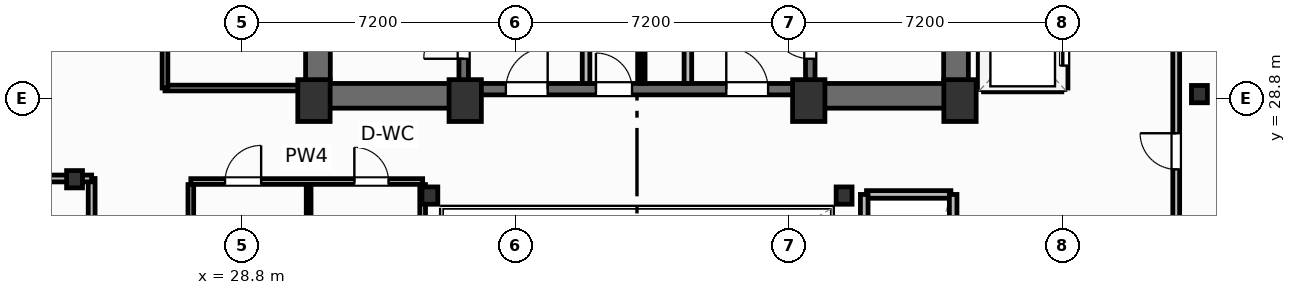
"""IFC4 building model, lengths in metres.
Left out: names, types, materials, properties, quantities, classifications, styles, units other than length and angle.
Written with IfcOpenShell. Run it as: python <this file> out.ifc"""

import sys

from ifc_helpers import new_model, si_unit, direction, frame, frame_2d, origin, origin_2d, place, context, subcontext, project, spatial, rectangle, i_section, extrude, element, fill, save


model = new_model("IFC4")
c1 = context("Model", 3, precision=1e-05, world=origin(), true_north=direction((0.0, 1.0)))
c2 = subcontext(c1, "Body", "Model", "MODEL_VIEW")
j1 = project(units=[si_unit("LENGTHUNIT", "METRE"), si_unit("PLANEANGLEUNIT", "RADIAN")], contexts=[c1])
p1 = place(None, origin())
s1 = spatial("IfcSite", under=j1, at=p1, CompositionType="ELEMENT")
p2 = place(p1, origin())
s2 = spatial("IfcBuilding", under=s1, at=p2, CompositionType="ELEMENT")
p3 = place(p2, frame((0.0, 0.0, 167.2)))
s3 = spatial("IfcBuildingStorey", under=s2, at=p3, CompositionType="ELEMENT", Elevation=167.2)
for number, where, z_axis, x_axis in (
    (1, (30.7, 28.75, 0.0), (0.0, 0.0, 1.0), (1.0, 0.0, 0.0)),
    (2, (34.68, 28.75, 0.0), (0.0, 0.0, 1.0), (1.0, 0.0, 0.0)),
    (3, (43.72, 28.75, 0.0), (0.0, 0.0, 1.0), (1.0, 0.0, 0.0)),
    (4, (47.7, 28.75, 0.0), (0.0, 0.0, 1.0), (1.0, 0.0, 0.0)),
):
    element("IfcColumn", number, at=place(p3, frame(where, z_axis=z_axis, x_axis=x_axis)), inside=s3, PredefinedType="COLUMN", context=c2, shape_type="SweptSolid", body=[
        extrude(rectangle(XDim=0.85, YDim=1.1, at=origin_2d()), origin(), (0.0, 0.0, 1.0), 3.7),
    ])
for number, where, z_axis, x_axis in (
    (5, (33.75, 26.25, 0.0), (0.0, 0.0, 1.0), (1.0, 0.0, 0.0)),
    (6, (44.65, 26.25, 0.0), (0.0, 0.0, 1.0), (1.0, 0.0, 0.0)),
    (7, (24.4, 26.68, 0.0), (0.0, 0.0, 1.0), (1.0, 0.0, 0.0)),
    (8, (54.0, 28.92, 0.0), (0.0, 0.0, 1.0), (1.0, 0.0, 0.0)),
):
    element("IfcColumn", number, at=place(p3, frame(where, z_axis=z_axis, x_axis=x_axis)), inside=s3, PredefinedType="COLUMN", context=c2, shape_type="SweptSolid", body=[
        extrude(i_section(OverallWidth=0.418, OverallDepth=0.455, WebThickness=0.042, FlangeThickness=0.068, FilletRadius=0.025, at=origin_2d()), origin(), (0.0, 0.0, 1.0), 3.7),
    ])
for number, where, z_axis, x_axis in (
    (9, (30.805, 29.2, 0.0), (0.0, 0.0, 1.0), (0.0, 1.0, 0.0)),
    (10, (47.595, 29.2, 0.0), (0.0, 0.0, 1.0), (0.0, 1.0, 0.0)),
):
    element("IfcWall", number, at=place(p3, frame(where, z_axis=z_axis, x_axis=x_axis)), inside=s3, PredefinedType="SHEAR", context=c2, shape_type="SweptSolid", body=[
        extrude(rectangle(XDim=9.22, YDim=0.65, at=frame_2d((4.61, 0.0))), origin(), (0.0, 0.0, 1.0), 3.45),
    ])
p4 = place(p3, frame((30.48, 28.875, 0.0), z_axis=(0.0, 0.0, 1.0), x_axis=(1.0, 0.0, 0.0)))
e11 = element("IfcWall", 11, at=p4, inside=s3, PredefinedType="SHEAR", context=c2, shape_type="SweptSolid", body=[
    extrude(rectangle(XDim=4.32, YDim=0.65, at=frame_2d((2.16, 0.0))), origin(), (0.0, 0.0, 1.0), 3.45),
])
p5 = place(p3, frame((43.6, 28.875, 0.0), z_axis=(0.0, 0.0, 1.0), x_axis=(1.0, 0.0, 0.0)))
e12 = element("IfcWall", 12, at=p5, inside=s3, PredefinedType="SHEAR", context=c2, shape_type="SweptSolid", body=[
    extrude(rectangle(XDim=4.32, YDim=0.65, at=frame_2d((2.16, 0.0))), origin(), (0.0, 0.0, 1.0), 3.45),
])
p6 = place(p3, frame((34.8, 29.05, 0.0), z_axis=(0.0, 0.0, 1.0), x_axis=(1.0, 0.0, 0.0)))
e13 = element("IfcWall", 13, at=p6, inside=s3, PredefinedType="SHEAR", context=c2, shape_type="SweptSolid", body=[
    extrude(rectangle(XDim=8.8, YDim=0.3, at=frame_2d((4.4, 0.0))), origin(), (0.0, 0.0, 1.0), 3.45),
])
p7 = place(p6, frame((0.95, 0.0, 0.0)))
e14 = element("IfcOpeningElement", 14, at=p7, cuts=e13, PredefinedType="OPENING", context=c2, shape_type="SweptSolid", body=[
    extrude(rectangle(XDim=1.1, YDim=2.15, at=frame_2d((0.55, 1.075))), frame((0.0, 0.16, 0.0), z_axis=(0.0, -1.0, 0.0), x_axis=(1.0, 0.0, 0.0)), (0.0, 0.0, 1.0), 0.32),
])
p8 = place(p6, frame((6.75, 0.0, 0.0)))
e15 = element("IfcOpeningElement", 15, at=p8, cuts=e13, PredefinedType="OPENING", context=c2, shape_type="SweptSolid", body=[
    extrude(rectangle(XDim=1.1, YDim=2.15, at=frame_2d((0.55, 1.075))), frame((0.0, 0.16, 0.0), z_axis=(0.0, -1.0, 0.0), x_axis=(1.0, 0.0, 0.0)), (0.0, 0.0, 1.0), 0.32),
])
p9 = place(p6, frame((3.32, 0.0, 0.0)))
e16 = element("IfcOpeningElement", 16, at=p9, cuts=e13, PredefinedType="OPENING", context=c2, shape_type="SweptSolid", body=[
    extrude(rectangle(XDim=0.95, YDim=2.15, at=frame_2d((0.475, 1.075))), frame((0.0, 0.16, 0.0), z_axis=(0.0, -1.0, 0.0), x_axis=(1.0, 0.0, 0.0)), (0.0, 0.0, 1.0), 0.32),
])
p10 = place(p3, frame((34.64, 29.2, 0.0), z_axis=(0.0, 0.0, 1.0), x_axis=(0.0, 1.0, 0.0)))
e17 = element("IfcWall", 17, at=p10, inside=s3, PredefinedType="SHEAR", context=c2, shape_type="SweptSolid", body=[
    extrude(rectangle(XDim=9.22, YDim=0.25, at=frame_2d((4.61, 0.0))), origin(), (0.0, 0.0, 1.0), 3.45),
])
p11 = place(p10, frame((0.65, 0.0, 0.0)))
e18 = element("IfcOpeningElement", 18, at=p11, cuts=e17, PredefinedType="OPENING", context=c2, shape_type="SweptSolid", body=[
    extrude(rectangle(XDim=1.05, YDim=2.15, at=frame_2d((0.525, 1.075))), frame((0.0, 0.135, 0.0), z_axis=(0.0, -1.0, 0.0), x_axis=(1.0, 0.0, 0.0)), (0.0, 0.0, 1.0), 0.27),
])
p12 = place(p3, frame((43.76, 29.2, 0.0), z_axis=(0.0, 0.0, 1.0), x_axis=(0.0, 1.0, 0.0)))
e19 = element("IfcWall", 19, at=p12, inside=s3, PredefinedType="SHEAR", context=c2, shape_type="SweptSolid", body=[
    extrude(rectangle(XDim=9.22, YDim=0.25, at=frame_2d((4.61, 0.0))), origin(), (0.0, 0.0, 1.0), 3.45),
])
p13 = place(p12, frame((0.65, 0.0, 0.0)))
e20 = element("IfcOpeningElement", 20, at=p13, cuts=e19, PredefinedType="OPENING", context=c2, shape_type="SweptSolid", body=[
    extrude(rectangle(XDim=1.05, YDim=2.15, at=frame_2d((0.525, 1.075))), frame((0.0, 0.135, 0.0), z_axis=(0.0, -1.0, 0.0), x_axis=(1.0, 0.0, 0.0)), (0.0, 0.0, 1.0), 0.27),
])
p14 = place(p3, frame((24.85, 19.2, 0.0), z_axis=(0.0, 0.0, 1.0), x_axis=(0.0, 1.0, 0.0)))
e21 = element("IfcWall", 21, at=p14, inside=s3, PredefinedType="PARTITIONING", context=c2, shape_type="SweptSolid", body=[
    extrude(rectangle(XDim=7.5, YDim=0.18, at=frame_2d((3.75, 0.0))), origin(), (0.0, 0.0, 1.0), 3.45),
])
p15 = place(p14, frame((3.275, 0.0, 0.0)))
e22 = element("IfcOpeningElement", 22, at=p15, cuts=e21, PredefinedType="OPENING", context=c2, shape_type="SweptSolid", body=[
    extrude(rectangle(XDim=0.95, YDim=2.05, at=frame_2d((0.475, 1.025))), frame((0.0, 0.1, 0.0), z_axis=(0.0, -1.0, 0.0), x_axis=(1.0, 0.0, 0.0)), (0.0, 0.0, 1.0), 0.2),
])
p16 = place(p3, frame((3.653, 26.7, 0.0), z_axis=(0.0, 0.0, 1.0), x_axis=(1.0, 0.0, 0.0)))
e23 = element("IfcWall", 23, at=p16, inside=s3, PredefinedType="PARTITIONING", context=c2, shape_type="SweptSolid", body=[
    extrude(rectangle(XDim=21.197, YDim=0.18, at=frame_2d((10.599, 0.0))), origin(), (0.0, 0.0, 1.0), 2.662),
])
p17 = place(p3, frame((53.39, 19.24, 0.0), z_axis=(0.0, 0.0, 1.0), x_axis=(0.0, 1.0, 0.0)))
e24 = element("IfcWall", 24, at=p17, inside=s3, PredefinedType="PARTITIONING", context=c2, shape_type="SweptSolid", body=[
    extrude(rectangle(XDim=20.06, YDim=0.18, at=frame_2d((10.03, 0.0))), origin(), (0.0, 0.0, 1.0), 3.45),
])
p18 = place(p17, frame((7.7, 0.0, 0.0)))
e25 = element("IfcOpeningElement", 25, at=p18, cuts=e24, PredefinedType="OPENING", context=c2, shape_type="SweptSolid", body=[
    extrude(rectangle(XDim=0.95, YDim=2.05, at=frame_2d((0.475, 1.025))), frame((0.0, 0.1, 0.0), z_axis=(0.0, -1.0, 0.0), x_axis=(1.0, 0.0, 0.0)), (0.0, 0.0, 1.0), 0.2),
])
for number, where, z_axis, x_axis in (
    (26, (37.86, 29.2, 0.0), (0.0, 0.0, 1.0), (0.0, 1.0, 0.0)),
    (27, (40.54, 29.2, 0.0), (0.0, 0.0, 1.0), (0.0, 1.0, 0.0)),
):
    element("IfcWall", number, at=place(p3, frame(where, z_axis=z_axis, x_axis=x_axis)), inside=s3, PredefinedType="PARTITIONING", context=c2, shape_type="SweptSolid", body=[
        extrude(rectangle(XDim=5.18, YDim=0.2, at=frame_2d((2.59, 0.0))), origin(), (0.0, 0.0, 1.0), 3.45),
    ])
p19 = place(p3, frame((39.35, 29.2, 0.0), z_axis=(0.0, 0.0, 1.0), x_axis=(0.0, 1.0, 0.0)))
e28 = element("IfcWall", 28, at=p19, inside=s3, PredefinedType="PARTITIONING", context=c2, shape_type="SweptSolid", body=[
    extrude(rectangle(XDim=5.22, YDim=0.125, at=frame_2d((2.61, 0.0))), origin(), (0.0, 0.0, 1.0), 3.45),
])
p20 = place(p19, frame((2.05, 0.0, 0.0)))
e29 = element("IfcOpeningElement", 29, at=p20, cuts=e28, PredefinedType="OPENING", context=c2, shape_type="SweptSolid", body=[
    extrude(rectangle(XDim=0.85, YDim=2.05, at=frame_2d((0.425, 1.025))), frame((0.0, 0.073, 0.0), z_axis=(0.0, -1.0, 0.0), x_axis=(1.0, 0.0, 0.0)), (0.0, 0.0, 1.0), 0.145),
])
p21 = place(p3, frame((27.46, 26.62, 0.0), z_axis=(0.0, 0.0, 1.0), x_axis=(1.0, 0.0, 0.0)))
e30 = element("IfcWall", 30, at=p21, inside=s3, PredefinedType="PARTITIONING", context=c2, shape_type="SweptSolid", body=[
    extrude(rectangle(XDim=6.1, YDim=0.15, at=frame_2d((3.05, 0.0))), origin(), (0.0, 0.0, 1.0), 2.662),
])
p22 = place(p21, frame((0.9, 0.0, 0.0)))
e31 = element("IfcOpeningElement", 31, at=p22, cuts=e30, PredefinedType="OPENING", context=c2, shape_type="SweptSolid", body=[
    extrude(rectangle(XDim=0.95, YDim=2.05, at=frame_2d((0.475, 1.025))), frame((0.0, 0.085, 0.0), z_axis=(0.0, -1.0, 0.0), x_axis=(1.0, 0.0, 0.0)), (0.0, 0.0, 1.0), 0.17),
])
p23 = place(p21, frame((4.303, 0.0, 0.0)))
e32 = element("IfcOpeningElement", 32, at=p23, cuts=e30, PredefinedType="OPENING", context=c2, shape_type="SweptSolid", body=[
    extrude(rectangle(XDim=0.9, YDim=2.05, at=frame_2d((0.45, 1.025))), frame((0.0, 0.085, 0.0), z_axis=(0.0, -1.0, 0.0), x_axis=(1.0, 0.0, 0.0)), (0.0, 0.0, 1.0), 0.17),
])
p24 = place(p3, frame((30.56, 19.38, 0.0), z_axis=(0.0, 0.0, 1.0), x_axis=(0.0, 1.0, 0.0)))
e33 = element("IfcWall", 33, at=p24, inside=s3, PredefinedType="PARTITIONING", context=c2, shape_type="SweptSolid", body=[
    extrude(rectangle(XDim=7.16, YDim=0.125, at=frame_2d((3.58, 0.0))), origin(), (0.0, 0.0, 1.0), 3.45),
])
p25 = place(p24, frame((1.4, 0.0, 0.0)))
e34 = element("IfcOpeningElement", 34, at=p25, cuts=e33, PredefinedType="OPENING", context=c2, shape_type="SweptSolid", body=[
    extrude(rectangle(XDim=0.92, YDim=2.05, at=frame_2d((0.46, 1.025))), frame((0.0, 0.073, 0.0), z_axis=(0.0, -1.0, 0.0), x_axis=(1.0, 0.0, 0.0)), (0.0, 0.0, 1.0), 0.145),
])
p26 = place(p3, frame((27.46, 19.38, 0.0), z_axis=(0.0, 0.0, 1.0), x_axis=(0.0, 1.0, 0.0)))
e35 = element("IfcWall", 35, at=p26, inside=s3, PredefinedType="PARTITIONING", context=c2, shape_type="SweptSolid", body=[
    extrude(rectangle(XDim=7.16, YDim=0.15, at=frame_2d((3.58, 0.0))), origin(), (0.0, 0.0, 1.0), 3.45),
])
p27 = place(p3, frame((33.56, 19.38, 0.0), z_axis=(0.0, 0.0, 1.0), x_axis=(0.0, 1.0, 0.0)))
e36 = element("IfcWall", 36, at=p27, inside=s3, PredefinedType="PARTITIONING", context=c2, shape_type="SweptSolid", body=[
    extrude(rectangle(XDim=7.16, YDim=0.15, at=frame_2d((3.58, 0.0))), origin(), (0.0, 0.0, 1.0), 2.824),
])
p28 = place(p3, frame((26.78, 29.08, 0.0), z_axis=(0.0, 0.0, 1.0), x_axis=(1.0, 0.0, 0.0)))
e37 = element("IfcWall", 37, at=p28, inside=s3, PredefinedType="PARTITIONING", context=c2, shape_type="SweptSolid", body=[
    extrude(rectangle(XDim=3.7, YDim=0.15, at=frame_2d((1.85, 0.0))), origin(), (0.0, 0.0, 1.0), 3.45),
])
p29 = place(p3, frame((26.78, 29.08, 0.0), z_axis=(0.0, 0.0, 1.0), x_axis=(0.0, 1.0, 0.0)))
e38 = element("IfcWall", 38, at=p29, inside=s3, PredefinedType="PARTITIONING", context=c2, shape_type="SweptSolid", body=[
    extrude(rectangle(XDim=9.18, YDim=0.15, at=frame_2d((4.59, 0.0))), origin(), (0.0, 0.0, 1.0), 3.45),
])
p30 = place(p29, frame((2.4, 0.0, 0.0)))
e39 = element("IfcOpeningElement", 39, at=p30, cuts=e38, PredefinedType="OPENING", context=c2, shape_type="SweptSolid", body=[
    extrude(rectangle(XDim=0.95, YDim=2.05, at=frame_2d((0.475, 1.025))), frame((0.0, 0.085, 0.0), z_axis=(0.0, -1.0, 0.0), x_axis=(1.0, 0.0, 0.0)), (0.0, 0.0, 1.0), 0.17),
])
p31 = place(p3, frame((48.32, 29.08, 0.0), z_axis=(0.0, 0.0, 1.0), x_axis=(1.0, 0.0, 0.0)))
e40 = element("IfcWall", 40, at=p31, inside=s3, PredefinedType="PARTITIONING", context=c2, shape_type="SweptSolid", body=[
    extrude(rectangle(XDim=2.06, YDim=0.2, at=frame_2d((1.03, 0.0))), origin(), (0.0, 0.0, 1.0), 2.662),
])
p32 = place(p3, frame((48.28, 29.08, 0.0), z_axis=(0.0, 0.0, 1.0), x_axis=(0.0, 1.0, 0.0)))
e41 = element("IfcWall", 41, at=p32, inside=s3, PredefinedType="PARTITIONING", context=c2, shape_type="SweptSolid", body=[
    extrude(rectangle(XDim=6.89, YDim=0.2, at=frame_2d((3.445, 0.0))), origin(), (0.0, 0.0, 1.0), 3.45),
])
p33 = place(p3, frame((50.44, 29.08, 0.0), z_axis=(0.0, 0.0, 1.0), x_axis=(0.0, 1.0, 0.0)))
e42 = element("IfcWall", 42, at=p33, inside=s3, PredefinedType="PARTITIONING", context=c2, shape_type="SweptSolid", body=[
    extrude(rectangle(XDim=6.89, YDim=0.2, at=frame_2d((3.445, 0.0))), origin(), (0.0, 0.0, 1.0), 3.45),
])
p34 = place(p33, frame((0.59, 0.0, 0.0)))
e43 = element("IfcOpeningElement", 43, at=p34, cuts=e42, PredefinedType="OPENING", context=c2, shape_type="SweptSolid", body=[
    extrude(rectangle(XDim=1.1, YDim=2.15, at=frame_2d((0.55, 1.075))), frame((0.0, 0.11, 0.0), z_axis=(0.0, -1.0, 0.0), x_axis=(1.0, 0.0, 0.0)), (0.0, 0.0, 1.0), 0.22),
])
p35 = place(p33, frame((2.89, 0.0, 0.0)))
e44 = element("IfcOpeningElement", 44, at=p35, cuts=e42, PredefinedType="OPENING", context=c2, shape_type="SweptSolid", body=[
    extrude(rectangle(XDim=1.1, YDim=2.15, at=frame_2d((0.55, 1.075))), frame((0.0, 0.11, 0.0), z_axis=(0.0, -1.0, 0.0), x_axis=(1.0, 0.0, 0.0)), (0.0, 0.0, 1.0), 0.22),
])
p36 = place(p33, frame((5.19, 0.0, 0.0)))
e45 = element("IfcOpeningElement", 45, at=p36, cuts=e42, PredefinedType="OPENING", context=c2, shape_type="SweptSolid", body=[
    extrude(rectangle(XDim=1.1, YDim=2.15, at=frame_2d((0.55, 1.075))), frame((0.0, 0.11, 0.0), z_axis=(0.0, -1.0, 0.0), x_axis=(1.0, 0.0, 0.0)), (0.0, 0.0, 1.0), 0.22),
])
p37 = place(p3, frame((45.24, 26.28, 0.0), z_axis=(0.0, 0.0, 1.0), x_axis=(1.0, 0.0, 0.0)))
e46 = element("IfcWall", 46, at=p37, inside=s3, PredefinedType="PARTITIONING", context=c2, shape_type="SweptSolid", body=[
    extrude(rectangle(XDim=2.22, YDim=0.2, at=frame_2d((1.11, 0.0))), origin(), (0.0, 0.0, 1.0), 3.45),
])
for number, where, z_axis, x_axis in (
    (47, (45.18, 19.38, 0.0), (0.0, 0.0, 1.0), (0.0, 1.0, 0.0)),
    (48, (47.52, 19.38, 0.0), (0.0, 0.0, 1.0), (0.0, 1.0, 0.0)),
):
    element("IfcWall", number, at=place(p3, frame(where, z_axis=z_axis, x_axis=x_axis)), inside=s3, PredefinedType="PARTITIONING", context=c2, shape_type="SweptSolid", body=[
        extrude(rectangle(XDim=6.9, YDim=0.2, at=frame_2d((3.45, 0.0))), origin(), (0.0, 0.0, 1.0), 3.45),
    ])
p38 = place(p18, origin())
e49 = element("IfcDoor", 49, at=p38, inside=s3, OperationType="SINGLE_SWING_RIGHT", PredefinedType="DOOR", context=c2, shape_type="SweptSolid", body=[
    extrude(rectangle(XDim=0.95, YDim=2.05, at=frame_2d((0.475, 1.025))), frame((0.0, 0.025, 0.0), z_axis=(0.0, -1.0, 0.0), x_axis=(1.0, 0.0, 0.0)), (0.0, 0.0, 1.0), 0.05),
])
fill(e25, e49)
p39 = place(p11, origin())
e50 = element("IfcDoor", 50, at=p39, inside=s3, OperationType="SINGLE_SWING_LEFT", PredefinedType="DOOR", context=c2, shape_type="SweptSolid", body=[
    extrude(rectangle(XDim=1.05, YDim=2.15, at=frame_2d((0.525, 1.075))), frame((0.0, 0.025, 0.0), z_axis=(0.0, -1.0, 0.0), x_axis=(1.0, 0.0, 0.0)), (0.0, 0.0, 1.0), 0.05),
])
fill(e18, e50)
p40 = place(p13, origin())
e51 = element("IfcDoor", 51, at=p40, inside=s3, OperationType="SINGLE_SWING_RIGHT", PredefinedType="DOOR", context=c2, shape_type="SweptSolid", body=[
    extrude(rectangle(XDim=1.05, YDim=2.15, at=frame_2d((0.525, 1.075))), frame((0.0, 0.025, 0.0), z_axis=(0.0, -1.0, 0.0), x_axis=(1.0, 0.0, 0.0)), (0.0, 0.0, 1.0), 0.05),
])
fill(e20, e51)
p41 = place(p7, origin())
e52 = element("IfcDoor", 52, at=p41, inside=s3, OperationType="SINGLE_SWING_RIGHT", PredefinedType="DOOR", context=c2, shape_type="SweptSolid", body=[
    extrude(rectangle(XDim=1.1, YDim=2.15, at=frame_2d((0.55, 1.075))), frame((0.0, 0.025, 0.0), z_axis=(0.0, -1.0, 0.0), x_axis=(1.0, 0.0, 0.0)), (0.0, 0.0, 1.0), 0.05),
])
fill(e14, e52)
p42 = place(p8, origin())
e53 = element("IfcDoor", 53, at=p42, inside=s3, OperationType="SINGLE_SWING_LEFT", PredefinedType="DOOR", context=c2, shape_type="SweptSolid", body=[
    extrude(rectangle(XDim=1.1, YDim=2.15, at=frame_2d((0.55, 1.075))), frame((0.0, 0.025, 0.0), z_axis=(0.0, -1.0, 0.0), x_axis=(1.0, 0.0, 0.0)), (0.0, 0.0, 1.0), 0.05),
])
fill(e15, e53)
p43 = place(p9, origin())
e54 = element("IfcDoor", 54, at=p43, inside=s3, OperationType="SINGLE_SWING_LEFT", PredefinedType="DOOR", context=c2, shape_type="SweptSolid", body=[
    extrude(rectangle(XDim=0.95, YDim=2.15, at=frame_2d((0.475, 1.075))), frame((0.0, 0.025, 0.0), z_axis=(0.0, -1.0, 0.0), x_axis=(1.0, 0.0, 0.0)), (0.0, 0.0, 1.0), 0.05),
])
fill(e16, e54)
p44 = place(p22, origin())
e55 = element("IfcDoor", 55, at=p44, inside=s3, OperationType="SINGLE_SWING_RIGHT", PredefinedType="DOOR", context=c2, shape_type="SweptSolid", body=[
    extrude(rectangle(XDim=0.95, YDim=2.05, at=frame_2d((0.475, 1.025))), frame((0.0, 0.025, 0.0), z_axis=(0.0, -1.0, 0.0), x_axis=(1.0, 0.0, 0.0)), (0.0, 0.0, 1.0), 0.05),
])
fill(e31, e55)
p45 = place(p23, origin())
e56 = element("IfcDoor", 56, at=p45, inside=s3, OperationType="SINGLE_SWING_LEFT", PredefinedType="DOOR", context=c2, shape_type="SweptSolid", body=[
    extrude(rectangle(XDim=0.9, YDim=2.05, at=frame_2d((0.45, 1.025))), frame((0.0, 0.025, 0.0), z_axis=(0.0, -1.0, 0.0), x_axis=(1.0, 0.0, 0.0)), (0.0, 0.0, 1.0), 0.05),
])
fill(e32, e56)
p46 = place(p34, origin())
e57 = element("IfcDoor", 57, at=p46, inside=s3, OperationType="SLIDING_TO_LEFT", PredefinedType="DOOR", context=c2, shape_type="SweptSolid", body=[
    extrude(rectangle(XDim=1.1, YDim=2.15, at=frame_2d((0.55, 1.075))), frame((0.0, 0.025, 0.0), z_axis=(0.0, -1.0, 0.0), x_axis=(1.0, 0.0, 0.0)), (0.0, 0.0, 1.0), 0.05),
])
fill(e43, e57)
save(model, sys.argv[1])
